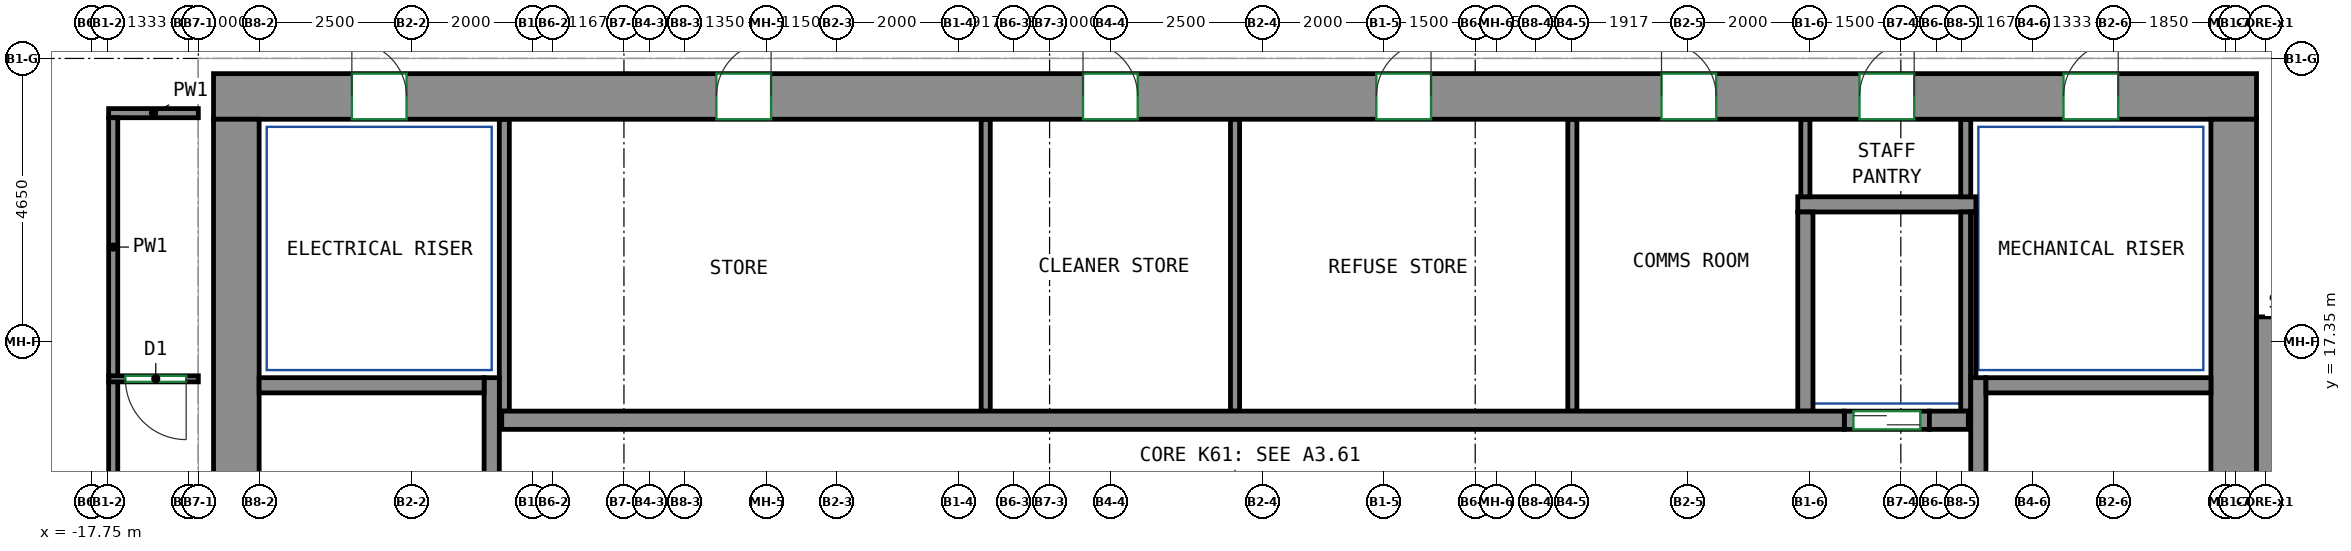
"""IFC4 building model, lengths in metres.
Left out: names, types, materials, properties, quantities, classifications, styles, units other than length and angle.
Written with IfcOpenShell. Run it as: python <this file> out.ifc"""

import sys

from ifc_helpers import new_model, si_unit, direction, frame, frame_2d, origin, place, context, subcontext, project, spatial, rectangle, extrude, source, transform, mapped, element, fill, save


model = new_model("IFC4")
c1 = context("Model", 3, precision=1e-05, world=origin(), true_north=direction((0.0, 1.0)))
c2 = subcontext(c1, "Body", "Model", "MODEL_VIEW")
j1 = project(units=[si_unit("LENGTHUNIT", "METRE"), si_unit("PLANEANGLEUNIT", "RADIAN")], contexts=[c1])
p1 = place(None, origin())
s1 = spatial("IfcSite", under=j1, at=p1, CompositionType="ELEMENT")
p2 = place(p1, origin())
s2 = spatial("IfcBuilding", under=s1, at=p2, CompositionType="ELEMENT")
p3 = place(p2, frame((0.0, 0.0, 249.2)))
s3 = spatial("IfcBuildingStorey", under=s2, at=p3, CompositionType="ELEMENT", Elevation=249.2)
m1 = source(origin(), c2, "Body", "SweptSolid", [
    extrude(rectangle(XDim=33.6, YDim=0.75, at=frame_2d((16.8, 0.0))), origin(), (0.0, 0.0, 1.0), 3.12),
])
p4 = place(p3, frame((-15.75, 21.375, 0.0), z_axis=(0.0, 0.0, 1.0), x_axis=(1.0, 0.0, 0.0)))
e1 = element("IfcWall", 1, at=p4, inside=s3, PredefinedType="SHEAR", context=c2, shape_type="MappedRepresentation", body=[
    mapped(m1, transform((0.0, 0.0, 0.0))),
])
p5 = place(p4, frame((8.27, 0.0, 0.0)))
e2 = element("IfcOpeningElement", 2, at=p5, cuts=e1, PredefinedType="OPENING", context=c2, shape_type="SweptSolid", body=[
    extrude(rectangle(XDim=0.9, YDim=2.1, at=frame_2d((0.45, 1.05))), frame((0.0, 0.385, 0.0), z_axis=(0.0, -1.0, 0.0), x_axis=(1.0, 0.0, 0.0)), (0.0, 0.0, 1.0), 0.77),
])
p6 = place(p4, frame((14.3, 0.0, 0.0)))
e3 = element("IfcOpeningElement", 3, at=p6, cuts=e1, PredefinedType="OPENING", context=c2, shape_type="SweptSolid", body=[
    extrude(rectangle(XDim=0.9, YDim=2.1, at=frame_2d((0.45, 1.05))), frame((0.0, 0.385, 0.0), z_axis=(0.0, -1.0, 0.0), x_axis=(1.0, 0.0, 0.0)), (0.0, 0.0, 1.0), 0.77),
])
p7 = place(p4, frame((19.124, 0.0, 0.0)))
e4 = element("IfcOpeningElement", 4, at=p7, cuts=e1, PredefinedType="OPENING", context=c2, shape_type="SweptSolid", body=[
    extrude(rectangle(XDim=0.9, YDim=2.1, at=frame_2d((0.45, 1.05))), frame((0.0, 0.385, 0.0), z_axis=(0.0, -1.0, 0.0), x_axis=(1.0, 0.0, 0.0)), (0.0, 0.0, 1.0), 0.77),
])
p8 = place(p4, frame((23.814, 0.0, 0.0)))
e5 = element("IfcOpeningElement", 5, at=p8, cuts=e1, PredefinedType="OPENING", context=c2, shape_type="SweptSolid", body=[
    extrude(rectangle(XDim=0.9, YDim=2.1, at=frame_2d((0.45, 1.05))), frame((0.0, 0.385, 0.0), z_axis=(0.0, -1.0, 0.0), x_axis=(1.0, 0.0, 0.0)), (0.0, 0.0, 1.0), 0.77),
])
p9 = place(p4, frame((27.07, 0.0, 0.0)))
e6 = element("IfcOpeningElement", 6, at=p9, cuts=e1, PredefinedType="OPENING", context=c2, shape_type="SweptSolid", body=[
    extrude(rectangle(XDim=0.9, YDim=2.1, at=frame_2d((0.45, 1.05))), frame((0.0, 0.385, 0.0), z_axis=(0.0, -1.0, 0.0), x_axis=(1.0, 0.0, 0.0)), (0.0, 0.0, 1.0), 0.77),
])
p10 = place(p4, frame((2.275, 0.0, 0.0)))
e7 = element("IfcOpeningElement", 7, at=p10, cuts=e1, PredefinedType="OPENING", context=c2, shape_type="SweptSolid", body=[
    extrude(rectangle(XDim=0.9, YDim=2.1, at=frame_2d((0.45, 1.05))), frame((0.0, 0.385, 0.0), z_axis=(0.0, -1.0, 0.0), x_axis=(1.0, 0.0, 0.0)), (0.0, 0.0, 1.0), 0.77),
])
p11 = place(p4, frame((30.425, 0.0, 0.0)))
e8 = element("IfcOpeningElement", 8, at=p11, cuts=e1, PredefinedType="OPENING", context=c2, shape_type="SweptSolid", body=[
    extrude(rectangle(XDim=0.9, YDim=2.1, at=frame_2d((0.45, 1.05))), frame((0.0, 0.385, 0.0), z_axis=(0.0, -1.0, 0.0), x_axis=(1.0, 0.0, 0.0)), (0.0, 0.0, 1.0), 0.77),
])
m2 = source(origin(), c2, "Body", "SweptSolid", [
    extrude(rectangle(XDim=12.0, YDim=0.75, at=frame_2d((6.0, 0.0))), origin(), (0.0, 0.0, 1.0), 3.12),
])
for number, where, z_axis, x_axis in (
    (9, (-15.375, 9.0, 0.0), (0.0, 0.0, 1.0), (0.0, 1.0, 0.0)),
    (10, (17.475, 9.0, 0.0), (0.0, 0.0, 1.0), (0.0, 1.0, 0.0)),
):
    element("IfcWall", number, at=place(p3, frame(where, z_axis=z_axis, x_axis=x_axis)), inside=s3, PredefinedType="SHEAR", context=c2, shape_type="MappedRepresentation", body=[
        mapped(m2, transform((0.0, 0.0, 0.0))),
    ])
m3 = source(origin(), c2, "Body", "SweptSolid", [
    extrude(rectangle(XDim=7.75, YDim=0.25, at=frame_2d((3.875, 0.0))), origin(), (0.0, 0.0, 1.0), 3.12),
])
p12 = place(p3, frame((-11.175, 9.0, 0.0), z_axis=(0.0, 0.0, 1.0), x_axis=(0.0, 1.0, 0.0)))
e11 = element("IfcWall", 11, at=p12, inside=s3, PredefinedType="SHEAR", context=c2, shape_type="MappedRepresentation", body=[
    mapped(m3, transform((0.0, 0.0, 0.0))),
])
m4 = source(origin(), c2, "Body", "SweptSolid", [
    extrude(rectangle(XDim=3.7, YDim=0.25, at=frame_2d((1.85, 0.0))), origin(), (0.0, 0.0, 1.0), 3.12),
])
p13 = place(p3, frame((-15.0, 16.625, 0.0), z_axis=(0.0, 0.0, 1.0), x_axis=(1.0, 0.0, 0.0)))
e12 = element("IfcWall", 12, at=p13, inside=s3, PredefinedType="SHEAR", context=c2, shape_type="MappedRepresentation", body=[
    mapped(m4, transform((0.0, 0.0, 0.0))),
])
p14 = place(p3, frame((13.275, 9.0, 0.0), z_axis=(0.0, 0.0, 1.0), x_axis=(0.0, 1.0, 0.0)))
e13 = element("IfcWall", 13, at=p14, inside=s3, PredefinedType="SHEAR", context=c2, shape_type="MappedRepresentation", body=[
    mapped(m3, transform((0.0, 0.0, 0.0))),
])
m5 = source(origin(), c2, "Body", "SweptSolid", [
    extrude(rectangle(XDim=3.7, YDim=0.25, at=frame_2d((1.85, 0.0))), origin(), (0.0, 0.0, 1.0), 3.12),
])
p15 = place(p3, frame((13.4, 16.625, 0.0), z_axis=(0.0, 0.0, 1.0), x_axis=(1.0, 0.0, 0.0)))
e14 = element("IfcWall", 14, at=p15, inside=s3, PredefinedType="SHEAR", context=c2, shape_type="MappedRepresentation", body=[
    mapped(m5, transform((0.0, 0.0, 0.0))),
])
m6 = source(origin(), c2, "Body", "SweptSolid", [
    extrude(rectangle(XDim=8.0, YDim=0.5, at=frame_2d((4.0, 0.0))), origin(), (0.0, 0.0, 1.0), 3.12),
])
p16 = place(p3, frame((18.1, 9.75, 0.0), z_axis=(0.0, 0.0, 1.0), x_axis=(0.0, 1.0, 0.0)))
e15 = element("IfcWall", 15, at=p16, inside=s3, PredefinedType="SHEAR", context=c2, shape_type="MappedRepresentation", body=[
    mapped(m6, transform((0.0, 0.0, 0.0))),
])
m7 = source(origin(), c2, "Body", "SweptSolid", [
    extrude(rectangle(XDim=22.08, YDim=0.3, at=frame_2d((11.04, 0.0))), origin(), (0.0, 0.0, 1.0), 3.12),
])
p17 = place(p3, frame((-11.01, 16.05, 0.0), z_axis=(0.0, 0.0, 1.0), x_axis=(1.0, 0.0, 0.0)))
e16 = element("IfcWall", 16, at=p17, inside=s3, PredefinedType="SHEAR", context=c2, shape_type="MappedRepresentation", body=[
    mapped(m7, transform((0.0, 0.0, 0.0))),
])
m8 = source(origin(), c2, "Body", "SweptSolid", [
    extrude(rectangle(XDim=0.64, YDim=0.3, at=frame_2d((0.32, 0.0))), origin(), (0.0, 0.0, 1.0), 3.12),
])
p18 = place(p3, frame((12.47, 16.05, 0.0), z_axis=(0.0, 0.0, 1.0), x_axis=(1.0, 0.0, 0.0)))
e17 = element("IfcWall", 17, at=p18, inside=s3, PredefinedType="SHEAR", context=c2, shape_type="MappedRepresentation", body=[
    mapped(m8, transform((0.0, 0.0, 0.0))),
])
m9 = source(origin(), c2, "Body", "SweptSolid", [
    extrude(rectangle(XDim=1.4, YDim=0.3, at=frame_2d((0.7, 0.0))), origin(), (0.0, 0.0, 1.0), 3.12),
])
p19 = place(p3, frame((11.07, 16.05, 0.0), z_axis=(0.0, 0.0, 1.0), x_axis=(1.0, 0.0, 0.0)))
e18 = element("IfcWall", 18, at=p19, inside=s3, PredefinedType="PARTITIONING", context=c2, shape_type="MappedRepresentation", body=[
    mapped(m9, transform((0.0, 0.0, 0.0))),
])
p20 = place(p19, frame((0.15, 0.0, 0.0)))
e19 = element("IfcOpeningElement", 19, at=p20, cuts=e18, PredefinedType="OPENING", context=c2, shape_type="SweptSolid", body=[
    extrude(rectangle(XDim=1.1, YDim=2.1, at=frame_2d((0.55, 1.05))), frame((0.0, 0.16, 0.0), z_axis=(0.0, -1.0, 0.0), x_axis=(1.0, 0.0, 0.0)), (0.0, 0.0, 1.0), 0.32),
])
m10 = source(origin(), c2, "Body", "SweptSolid", [
    extrude(rectangle(XDim=2.93, YDim=0.25, at=frame_2d((1.465, 0.0))), origin(), (0.0, 0.0, 1.0), 3.12),
])
p21 = place(p3, frame((10.305, 19.6, 0.0), z_axis=(0.0, 0.0, 1.0), x_axis=(1.0, 0.0, 0.0)))
e20 = element("IfcWall", 20, at=p21, inside=s3, PredefinedType="PARTITIONING", context=c2, shape_type="MappedRepresentation", body=[
    mapped(m10, transform((0.0, 0.0, 0.0))),
])
m11 = source(origin(), c2, "Body", "SweptSolid", [
    extrude(rectangle(XDim=3.275, YDim=0.165, at=frame_2d((1.638, 0.0))), origin(), (0.0, 0.0, 1.0), 3.12),
])
p22 = place(p3, frame((13.067, 16.2, 0.0), z_axis=(0.0, 0.0, 1.0), x_axis=(0.0, 1.0, 0.0)))
e21 = element("IfcWall", 21, at=p22, inside=s3, PredefinedType="PARTITIONING", context=c2, shape_type="MappedRepresentation", body=[
    mapped(m11, transform((0.0, 0.0, 0.0))),
])
m12 = source(origin(), c2, "Body", "SweptSolid", [
    extrude(rectangle(XDim=1.275, YDim=0.165, at=frame_2d((0.637, 0.0))), origin(), (0.0, 0.0, 1.0), 3.12),
])
p23 = place(p3, frame((13.067, 19.725, 0.0), z_axis=(0.0, 0.0, 1.0), x_axis=(0.0, 1.0, 0.0)))
e22 = element("IfcWall", 22, at=p23, inside=s3, PredefinedType="PARTITIONING", context=c2, shape_type="MappedRepresentation", body=[
    mapped(m12, transform((0.0, 0.0, 0.0))),
])
m13 = source(origin(), c2, "Body", "SweptSolid", [
    extrude(rectangle(XDim=4.8, YDim=0.165, at=frame_2d((2.4, 0.0))), origin(), (0.0, 0.0, 1.0), 3.12),
])
p24 = place(p3, frame((-10.968, 16.2, 0.0), z_axis=(0.0, 0.0, 1.0), x_axis=(0.0, 1.0, 0.0)))
e23 = element("IfcWall", 23, at=p24, inside=s3, PredefinedType="PARTITIONING", context=c2, shape_type="MappedRepresentation", body=[
    mapped(m13, transform((0.0, 0.0, 0.0))),
])
m14 = source(origin(), c2, "Body", "SweptSolid", [
    extrude(rectangle(XDim=3.275, YDim=0.25, at=frame_2d((1.638, 0.0))), origin(), (0.0, 0.0, 1.0), 3.12),
])
p25 = place(p3, frame((10.43, 16.2, 0.0), z_axis=(0.0, 0.0, 1.0), x_axis=(0.0, 1.0, 0.0)))
e24 = element("IfcWall", 24, at=p25, inside=s3, PredefinedType="PARTITIONING", context=c2, shape_type="MappedRepresentation", body=[
    mapped(m14, transform((0.0, 0.0, 0.0))),
])
m15 = source(origin(), c2, "Body", "SweptSolid", [
    extrude(rectangle(XDim=2.725, YDim=0.085, at=frame_2d((1.363, 0.0))), origin(), (0.0, 0.0, 1.0), 3.12),
])
p26 = place(p3, frame((13.192, 16.75, 0.0), z_axis=(0.0, 0.0, 1.0), x_axis=(0.0, 1.0, 0.0)))
e25 = element("IfcWall", 25, at=p26, inside=s3, PredefinedType="PARTITIONING", context=c2, shape_type="MappedRepresentation", body=[
    mapped(m15, transform((0.0, 0.0, 0.0))),
])
m16 = source(origin(), c2, "Body", "SweptSolid", [
    extrude(rectangle(XDim=4.8, YDim=0.15, at=frame_2d((2.4, 0.0))), origin(), (0.0, 0.0, 1.0), 3.12),
])
for number, where, z_axis, x_axis in (
    (26, (-3.05, 16.2, 0.0), (0.0, 0.0, 1.0), (0.0, 1.0, 0.0)),
    (27, (1.05, 16.2, 0.0), (0.0, 0.0, 1.0), (0.0, 1.0, 0.0)),
    (28, (6.598, 16.2, 0.0), (0.0, 0.0, 1.0), (0.0, 1.0, 0.0)),
):
    element("IfcWall", number, at=place(p3, frame(where, z_axis=z_axis, x_axis=x_axis)), inside=s3, PredefinedType="PARTITIONING", context=c2, shape_type="MappedRepresentation", body=[
        mapped(m16, transform((0.0, 0.0, 0.0))),
    ])
m17 = source(origin(), c2, "Body", "SweptSolid", [
    extrude(rectangle(XDim=1.275, YDim=0.15, at=frame_2d((0.637, 0.0))), origin(), (0.0, 0.0, 1.0), 3.12),
])
p27 = place(p3, frame((10.43, 19.725, 0.0), z_axis=(0.0, 0.0, 1.0), x_axis=(0.0, 1.0, 0.0)))
e29 = element("IfcWall", 29, at=p27, inside=s3, PredefinedType="PARTITIONING", context=c2, shape_type="MappedRepresentation", body=[
    mapped(m17, transform((0.0, 0.0, 0.0))),
])
p28 = place(p3, frame((-17.4, 4.214, 0.0), z_axis=(0.0, 0.0, 1.0), x_axis=(0.0, 1.0, 0.0)))
e30 = element("IfcWall", 30, at=p28, inside=s3, PredefinedType="PARTITIONING", context=c2, shape_type="SweptSolid", body=[
    extrude(rectangle(XDim=12.477, YDim=0.15, at=frame_2d((6.238, 0.0))), origin(), (0.0, 0.0, 1.0), 3.12),
])
p29 = place(p3, frame((-17.475, 21.1, 0.0), z_axis=(0.0, 0.0, 1.0), x_axis=(1.0, 0.0, 0.0)))
e31 = element("IfcWall", 31, at=p29, inside=s3, PredefinedType="PARTITIONING", context=c2, shape_type="SweptSolid", body=[
    extrude(rectangle(XDim=1.475, YDim=0.15, at=frame_2d((0.738, 0.0))), origin(), (0.0, 0.0, 1.0), 3.12),
])
p30 = place(p3, frame((-17.4, 16.771, 0.0), z_axis=(0.0, 0.0, 1.0), x_axis=(0.0, 1.0, 0.0)))
e32 = element("IfcWall", 32, at=p30, inside=s3, PredefinedType="PARTITIONING", context=c2, shape_type="SweptSolid", body=[
    extrude(rectangle(XDim=4.254, YDim=0.15, at=frame_2d((2.127, 0.0))), origin(), (0.0, 0.0, 1.0), 3.12),
])
p31 = place(p3, frame((-16.0, 16.731, 0.0), z_axis=(0.0, 0.0, 1.0), x_axis=(-1.0, 0.0, 0.0)))
e33 = element("IfcWall", 33, at=p31, inside=s3, PredefinedType="PARTITIONING", context=c2, shape_type="SweptSolid", body=[
    extrude(rectangle(XDim=1.473, YDim=0.1, at=frame_2d((0.736, 0.0))), origin(), (0.0, 0.0, 1.0), 3.12),
])
p32 = place(p31, frame((0.2, 0.0, 0.0)))
e34 = element("IfcOpeningElement", 34, at=p32, cuts=e33, PredefinedType="OPENING", context=c2, shape_type="SweptSolid", body=[
    extrude(rectangle(XDim=1.0, YDim=2.1, at=frame_2d((0.5, 1.05))), frame((0.0, 0.06, 0.0), z_axis=(0.0, -1.0, 0.0), x_axis=(1.0, 0.0, 0.0)), (0.0, 0.0, 1.0), 0.12),
])
p33 = place(p20, origin())
e35 = element("IfcDoor", 35, at=p33, inside=s3, OperationType="DOUBLE_DOOR_SLIDING", PredefinedType="DOOR", context=c2, shape_type="SweptSolid", body=[
    extrude(rectangle(XDim=1.1, YDim=2.1, at=frame_2d((0.55, 1.05))), frame((0.0, 0.025, 0.0), z_axis=(0.0, -1.0, 0.0), x_axis=(1.0, 0.0, 0.0)), (0.0, 0.0, 1.0), 0.05),
])
fill(e19, e35)
p34 = place(p5, origin())
e36 = element("IfcDoor", 36, at=p34, inside=s3, OperationType="SINGLE_SWING_RIGHT", PredefinedType="DOOR", context=c2, shape_type="SweptSolid", body=[
    extrude(rectangle(XDim=0.9, YDim=2.1, at=frame_2d((0.45, 1.05))), frame((0.0, -0.23, 0.0), z_axis=(0.0, -1.0, 0.0), x_axis=(1.0, 0.0, 0.0)), (0.0, 0.0, 1.0), 0.05),
])
fill(e2, e36)
p35 = place(p6, origin())
e37 = element("IfcDoor", 37, at=p35, inside=s3, OperationType="SINGLE_SWING_LEFT", PredefinedType="DOOR", context=c2, shape_type="SweptSolid", body=[
    extrude(rectangle(XDim=0.9, YDim=2.1, at=frame_2d((0.45, 1.05))), frame((0.0, -0.23, 0.0), z_axis=(0.0, -1.0, 0.0), x_axis=(1.0, 0.0, 0.0)), (0.0, 0.0, 1.0), 0.05),
])
fill(e3, e37)
p36 = place(p7, origin())
e38 = element("IfcDoor", 38, at=p36, inside=s3, OperationType="SINGLE_SWING_RIGHT", PredefinedType="DOOR", context=c2, shape_type="SweptSolid", body=[
    extrude(rectangle(XDim=0.9, YDim=2.1, at=frame_2d((0.45, 1.05))), frame((0.0, -0.23, 0.0), z_axis=(0.0, -1.0, 0.0), x_axis=(1.0, 0.0, 0.0)), (0.0, 0.0, 1.0), 0.05),
])
fill(e4, e38)
p37 = place(p8, origin())
e39 = element("IfcDoor", 39, at=p37, inside=s3, OperationType="SINGLE_SWING_LEFT", PredefinedType="DOOR", context=c2, shape_type="SweptSolid", body=[
    extrude(rectangle(XDim=0.9, YDim=2.1, at=frame_2d((0.45, 1.05))), frame((0.0, -0.23, 0.0), z_axis=(0.0, -1.0, 0.0), x_axis=(1.0, 0.0, 0.0)), (0.0, 0.0, 1.0), 0.05),
])
fill(e5, e39)
p38 = place(p9, origin())
e40 = element("IfcDoor", 40, at=p38, inside=s3, OperationType="SINGLE_SWING_RIGHT", PredefinedType="DOOR", context=c2, shape_type="SweptSolid", body=[
    extrude(rectangle(XDim=0.9, YDim=2.1, at=frame_2d((0.45, 1.05))), frame((0.0, -0.23, 0.0), z_axis=(0.0, -1.0, 0.0), x_axis=(1.0, 0.0, 0.0)), (0.0, 0.0, 1.0), 0.05),
])
fill(e6, e40)
p39 = place(p10, origin())
e41 = element("IfcDoor", 41, at=p39, inside=s3, OperationType="SINGLE_SWING_LEFT", PredefinedType="DOOR", context=c2, shape_type="SweptSolid", body=[
    extrude(rectangle(XDim=0.9, YDim=2.1, at=frame_2d((0.45, 1.05))), frame((0.0, -0.23, 0.0), z_axis=(0.0, -1.0, 0.0), x_axis=(1.0, 0.0, 0.0)), (0.0, 0.0, 1.0), 0.05),
])
fill(e7, e41)
p40 = place(p11, origin())
e42 = element("IfcDoor", 42, at=p40, inside=s3, OperationType="SINGLE_SWING_RIGHT", PredefinedType="DOOR", context=c2, shape_type="SweptSolid", body=[
    extrude(rectangle(XDim=0.9, YDim=2.1, at=frame_2d((0.45, 1.05))), frame((0.0, -0.23, 0.0), z_axis=(0.0, -1.0, 0.0), x_axis=(1.0, 0.0, 0.0)), (0.0, 0.0, 1.0), 0.05),
])
fill(e8, e42)
p41 = place(p32, origin())
e43 = element("IfcDoor", 43, at=p41, inside=s3, OperationType="SINGLE_SWING_LEFT", PredefinedType="DOOR", context=c2, shape_type="SweptSolid", body=[
    extrude(rectangle(XDim=1.0, YDim=2.1, at=frame_2d((0.5, 1.05))), frame((0.0, 0.025, 0.0), z_axis=(0.0, -1.0, 0.0), x_axis=(1.0, 0.0, 0.0)), (0.0, 0.0, 1.0), 0.05),
])
fill(e34, e43)
save(model, sys.argv[1])
